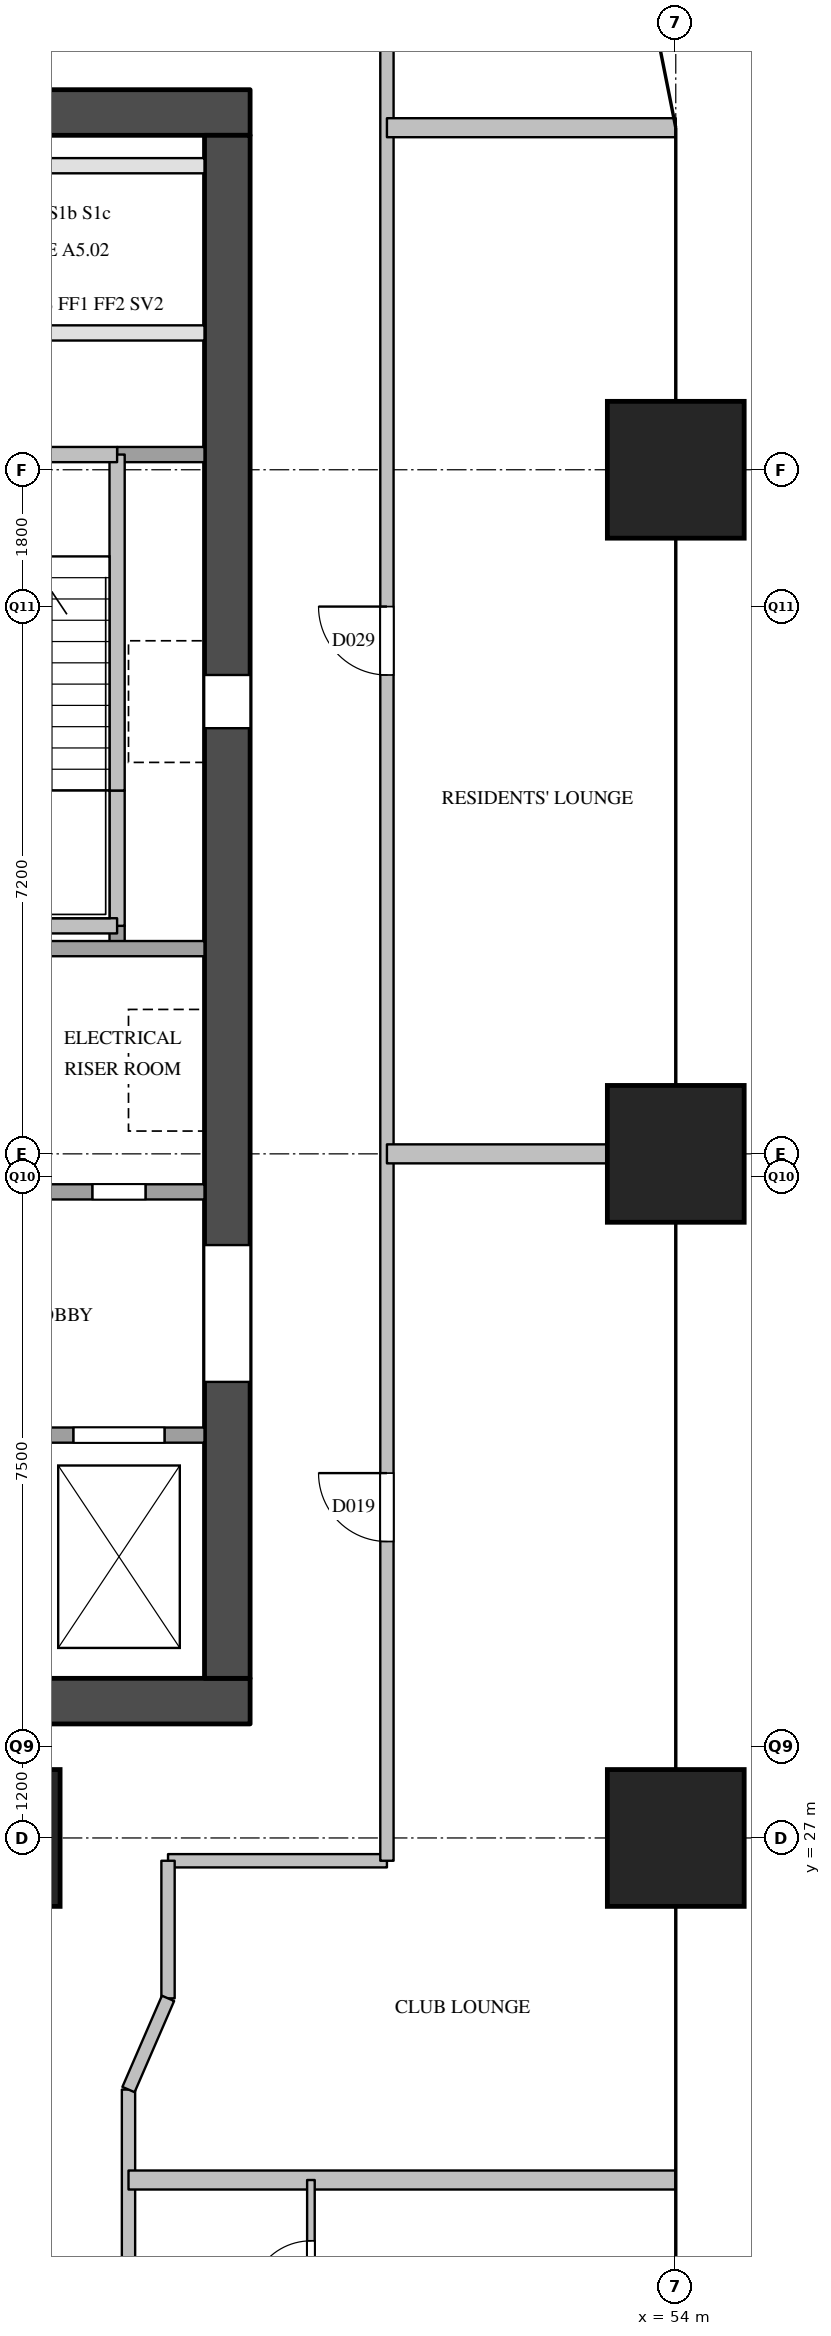
"""IFC4 building model, lengths in metres.
Left out: names, types, materials, properties, quantities, classifications, styles, units other than length and angle.
Written with IfcOpenShell. Run it as: python <this file> out.ifc"""

import sys

from ifc_helpers import new_model, si_unit, direction, frame, frame_2d, origin, origin_2d, place, context, subcontext, project, spatial, rectangle, extrude, element, fill, save


model = new_model("IFC4")
c1 = context("Model", 3, precision=1e-05, world=origin(), true_north=direction((0.0, 1.0)))
c2 = subcontext(c1, "Body", "Model", "MODEL_VIEW")
j1 = project(units=[si_unit("LENGTHUNIT", "METRE"), si_unit("PLANEANGLEUNIT", "RADIAN")], contexts=[c1])
p1 = place(None, origin())
s1 = spatial("IfcSite", under=j1, at=p1, CompositionType="ELEMENT")
p2 = place(p1, origin())
s2 = spatial("IfcBuilding", under=s1, at=p2, CompositionType="ELEMENT")
p3 = place(p2, frame((0.0, 0.0, 100.6)))
s3 = spatial("IfcBuildingStorey", under=s2, at=p3, CompositionType="ELEMENT", Elevation=100.6)
for number, where, z_axis, x_axis in (
    (1, (45.0, 27.0, 0.0), (0.0, 0.0, 1.0), (1.0, 0.0, 0.0)),
    (2, (54.0, 27.0, 0.0), (0.0, 0.0, 1.0), (1.0, 0.0, 0.0)),
    (3, (54.0, 36.0, 0.0), (0.0, 0.0, 1.0), (1.0, 0.0, 0.0)),
    (4, (54.0, 45.0, 0.0), (0.0, 0.0, 1.0), (1.0, 0.0, 0.0)),
):
    element("IfcColumn", number, at=place(p3, frame(where, z_axis=z_axis, x_axis=x_axis)), inside=s3, PredefinedType="COLUMN", context=c2, shape_type="SweptSolid", body=[
        extrude(rectangle(XDim=1.8, YDim=1.8, at=origin_2d()), origin(), (0.0, 0.0, 1.0), 3.8),
    ])
for number, where, z_axis, x_axis in (
    (5, (36.0, 28.8, 0.0), (0.0, 0.0, 1.0), (1.0, 0.0, 0.0)),
    (6, (36.0, 49.7, 0.0), (0.0, 0.0, 1.0), (1.0, 0.0, 0.0)),
):
    element("IfcWall", number, at=place(p3, frame(where, z_axis=z_axis, x_axis=x_axis)), inside=s3, PredefinedType="SHEAR", context=c2, shape_type="SweptSolid", body=[
        extrude(rectangle(XDim=12.4, YDim=0.6, at=frame_2d((6.2, 0.0))), origin(), (0.0, 0.0, 1.0), 3.5),
    ])
p4 = place(p3, frame((48.1, 29.1, 0.0), z_axis=(0.0, 0.0, 1.0), x_axis=(0.0, 1.0, 0.0)))
e7 = element("IfcWall", 7, at=p4, inside=s3, PredefinedType="SHEAR", context=c2, shape_type="SweptSolid", body=[
    extrude(rectangle(XDim=20.3, YDim=0.6, at=frame_2d((10.15, 0.0))), origin(), (0.0, 0.0, 1.0), 3.5),
])
p5 = place(p4, frame((12.5, 0.0, 0.0)))
e8 = element("IfcOpeningElement", 8, at=p5, cuts=e7, PredefinedType="OPENING", context=c2, shape_type="SweptSolid", body=[
    extrude(rectangle(XDim=0.7, YDim=2.1, at=frame_2d((0.35, 1.05))), frame((0.0, 0.31, 0.0), z_axis=(0.0, -1.0, 0.0), x_axis=(1.0, 0.0, 0.0)), (0.0, 0.0, 1.0), 0.62),
])
p6 = place(p4, frame((3.9, 0.0, 0.0)))
e9 = element("IfcOpeningElement", 9, at=p6, cuts=e7, PredefinedType="OPENING", context=c2, shape_type="SweptSolid", body=[
    extrude(rectangle(XDim=1.8, YDim=2.1, at=frame_2d((0.9, 1.05))), frame((0.0, 0.31, 0.0), z_axis=(0.0, -1.0, 0.0), x_axis=(1.0, 0.0, 0.0)), (0.0, 0.0, 1.0), 0.62),
])
p7 = place(p3, frame((46.65, 38.7, 0.0), z_axis=(0.0, 0.0, 1.0), x_axis=(0.0, 1.0, 0.0)))
e10 = element("IfcWall", 10, at=p7, inside=s3, PredefinedType="SOLIDWALL", context=c2, shape_type="SweptSolid", body=[
    extrude(rectangle(XDim=0.3, YDim=0.2, at=frame_2d((0.15, 0.0))), origin(), (0.0, 0.0, 1.0), 3.5),
])
p8 = place(p3, frame((46.65, 39.0, 0.0), z_axis=(0.0, 0.0, 1.0), x_axis=(0.0, 1.0, 0.0)))
e11 = element("IfcWall", 11, at=p8, inside=s3, PredefinedType="SOLIDWALL", context=c2, shape_type="SweptSolid", body=[
    extrude(rectangle(XDim=1.78, YDim=0.2, at=frame_2d((0.89, 0.0))), origin(), (0.0, 0.0, 1.0), 3.5),
])
p9 = place(p3, frame((46.65, 40.78, 0.0), z_axis=(0.0, 0.0, 1.0), x_axis=(0.0, 1.0, 0.0)))
e12 = element("IfcWall", 12, at=p9, inside=s3, PredefinedType="SOLIDWALL", context=c2, shape_type="SweptSolid", body=[
    extrude(rectangle(XDim=4.42, YDim=0.2, at=frame_2d((2.21, 0.0))), origin(), (0.0, 0.0, 1.0), 3.5),
])
p10 = place(p3, frame((36.6, 32.3, 0.0), z_axis=(0.0, 0.0, 1.0), x_axis=(1.0, 0.0, 0.0)))
e13 = element("IfcWall", 13, at=p10, inside=s3, PredefinedType="SOLIDWALL", context=c2, shape_type="SweptSolid", body=[
    extrude(rectangle(XDim=11.2, YDim=0.2, at=frame_2d((5.6, 0.0))), origin(), (0.0, 0.0, 1.0), 3.5),
])
p11 = place(p10, frame((7.225, 0.0, 0.0)))
e14 = element("IfcOpeningElement", 14, at=p11, cuts=e13, PredefinedType="OPENING", context=c2, shape_type="SweptSolid", body=[
    extrude(rectangle(XDim=1.2, YDim=2.1, at=frame_2d((0.6, 1.05))), frame((0.0, 0.11, 0.0), z_axis=(0.0, -1.0, 0.0), x_axis=(1.0, 0.0, 0.0)), (0.0, 0.0, 1.0), 0.22),
])
p12 = place(p10, frame((9.475, 0.0, 0.0)))
e15 = element("IfcOpeningElement", 15, at=p12, cuts=e13, PredefinedType="OPENING", context=c2, shape_type="SweptSolid", body=[
    extrude(rectangle(XDim=1.2, YDim=2.1, at=frame_2d((0.6, 1.05))), frame((0.0, 0.11, 0.0), z_axis=(0.0, -1.0, 0.0), x_axis=(1.0, 0.0, 0.0)), (0.0, 0.0, 1.0), 0.22),
])
p13 = place(p3, frame((43.3, 35.5, 0.0), z_axis=(0.0, 0.0, 1.0), x_axis=(1.0, 0.0, 0.0)))
e16 = element("IfcWall", 16, at=p13, inside=s3, PredefinedType="SOLIDWALL", context=c2, shape_type="SweptSolid", body=[
    extrude(rectangle(XDim=4.5, YDim=0.2, at=frame_2d((2.25, 0.0))), origin(), (0.0, 0.0, 1.0), 3.5),
])
p14 = place(p13, frame((0.525, 0.0, 0.0)))
e17 = element("IfcOpeningElement", 17, at=p14, cuts=e16, PredefinedType="OPENING", context=c2, shape_type="SweptSolid", body=[
    extrude(rectangle(XDim=1.2, YDim=2.1, at=frame_2d((0.6, 1.05))), frame((0.0, 0.11, 0.0), z_axis=(0.0, -1.0, 0.0), x_axis=(1.0, 0.0, 0.0)), (0.0, 0.0, 1.0), 0.22),
])
p15 = place(p13, frame((3.025, 0.0, 0.0)))
e18 = element("IfcOpeningElement", 18, at=p15, cuts=e16, PredefinedType="OPENING", context=c2, shape_type="SweptSolid", body=[
    extrude(rectangle(XDim=0.7, YDim=2.1, at=frame_2d((0.35, 1.05))), frame((0.0, 0.11, 0.0), z_axis=(0.0, -1.0, 0.0), x_axis=(1.0, 0.0, 0.0)), (0.0, 0.0, 1.0), 0.22),
])
p16 = place(p3, frame((43.3, 38.7, 0.0), z_axis=(0.0, 0.0, 1.0), x_axis=(1.0, 0.0, 0.0)))
e19 = element("IfcWall", 19, at=p16, inside=s3, PredefinedType="SOLIDWALL", context=c2, shape_type="SweptSolid", body=[
    extrude(rectangle(XDim=4.5, YDim=0.2, at=frame_2d((2.25, 0.0))), origin(), (0.0, 0.0, 1.0), 3.5),
])
p17 = place(p3, frame((43.4, 39.0, 0.0), z_axis=(0.0, 0.0, 1.0), x_axis=(1.0, 0.0, 0.0)))
e20 = element("IfcWall", 20, at=p17, inside=s3, PredefinedType="SOLIDWALL", context=c2, shape_type="SweptSolid", body=[
    extrude(rectangle(XDim=3.25, YDim=0.2, at=frame_2d((1.625, 0.0))), origin(), (0.0, 0.0, 1.0), 3.5),
])
p18 = place(p3, frame((46.65, 45.2, 0.0), z_axis=(0.0, 0.0, 1.0), x_axis=(1.0, 0.0, 0.0)))
e21 = element("IfcWall", 21, at=p18, inside=s3, PredefinedType="SOLIDWALL", context=c2, shape_type="SweptSolid", body=[
    extrude(rectangle(XDim=1.15, YDim=0.2, at=frame_2d((0.575, 0.0))), origin(), (0.0, 0.0, 1.0), 3.5),
])
p19 = place(p3, frame((36.6, 45.2, 0.0), z_axis=(0.0, 0.0, 1.0), x_axis=(1.0, 0.0, 0.0)))
e22 = element("IfcWall", 22, at=p19, inside=s3, PredefinedType="SOLIDWALL", context=c2, shape_type="SweptSolid", body=[
    extrude(rectangle(XDim=10.05, YDim=0.2, at=frame_2d((5.025, 0.0))), origin(), (0.0, 0.0, 1.0), 3.5),
])
p20 = place(p19, frame((1.125, 0.0, 0.0)))
e23 = element("IfcOpeningElement", 23, at=p20, cuts=e22, PredefinedType="OPENING", context=c2, shape_type="SweptSolid", body=[
    extrude(rectangle(XDim=1.1, YDim=2.1, at=frame_2d((0.55, 1.05))), frame((0.0, 0.11, 0.0), z_axis=(0.0, -1.0, 0.0), x_axis=(1.0, 0.0, 0.0)), (0.0, 0.0, 1.0), 0.22),
])
p21 = place(p19, frame((4.475, 0.0, 0.0)))
e24 = element("IfcOpeningElement", 24, at=p21, cuts=e22, PredefinedType="OPENING", context=c2, shape_type="SweptSolid", body=[
    extrude(rectangle(XDim=1.1, YDim=2.1, at=frame_2d((0.55, 1.05))), frame((0.0, 0.11, 0.0), z_axis=(0.0, -1.0, 0.0), x_axis=(1.0, 0.0, 0.0)), (0.0, 0.0, 1.0), 0.22),
])
p22 = place(p19, frame((7.825, 0.0, 0.0)))
e25 = element("IfcOpeningElement", 25, at=p22, cuts=e22, PredefinedType="OPENING", context=c2, shape_type="SweptSolid", body=[
    extrude(rectangle(XDim=1.1, YDim=2.1, at=frame_2d((0.55, 1.05))), frame((0.0, 0.11, 0.0), z_axis=(0.0, -1.0, 0.0), x_axis=(1.0, 0.0, 0.0)), (0.0, 0.0, 1.0), 0.22),
])
p23 = place(p3, frame((36.6, 46.8, 0.0), z_axis=(0.0, 0.0, 1.0), x_axis=(1.0, 0.0, 0.0)))
e26 = element("IfcWall", 26, at=p23, inside=s3, PredefinedType="PARTITIONING", context=c2, shape_type="SweptSolid", body=[
    extrude(rectangle(XDim=11.2, YDim=0.2, at=frame_2d((5.6, 0.0))), origin(), (0.0, 0.0, 1.0), 3.5),
])
p24 = place(p23, frame((1.23, 0.0, 0.0)))
e27 = element("IfcOpeningElement", 27, at=p24, cuts=e26, PredefinedType="OPENING", context=c2, shape_type="SweptSolid", body=[
    extrude(rectangle(XDim=0.9, YDim=2.1, at=frame_2d((0.45, 1.05))), frame((0.0, 0.11, 0.0), z_axis=(0.0, -1.0, 0.0), x_axis=(1.0, 0.0, 0.0)), (0.0, 0.0, 1.0), 0.22),
])
p25 = place(p23, frame((6.83, 0.0, 0.0)))
e28 = element("IfcOpeningElement", 28, at=p25, cuts=e26, PredefinedType="OPENING", context=c2, shape_type="SweptSolid", body=[
    extrude(rectangle(XDim=0.9, YDim=2.1, at=frame_2d((0.45, 1.05))), frame((0.0, 0.11, 0.0), z_axis=(0.0, -1.0, 0.0), x_axis=(1.0, 0.0, 0.0)), (0.0, 0.0, 1.0), 0.22),
])
p26 = place(p3, frame((36.6, 49.0, 0.0), z_axis=(0.0, 0.0, 1.0), x_axis=(1.0, 0.0, 0.0)))
e29 = element("IfcWall", 29, at=p26, inside=s3, PredefinedType="PARTITIONING", context=c2, shape_type="SweptSolid", body=[
    extrude(rectangle(XDim=11.2, YDim=0.2, at=frame_2d((5.6, 0.0))), origin(), (0.0, 0.0, 1.0), 3.5),
])
p27 = place(p3, frame((47.32, 26.7, 0.0), z_axis=(0.0, 0.0, 1.0), x_axis=(1.0, 0.0, 0.0)))
e30 = element("IfcWall", 30, at=p27, inside=s3, PredefinedType="PARTITIONING", context=c2, shape_type="SweptSolid", body=[
    extrude(rectangle(XDim=2.88, YDim=0.175, at=frame_2d((1.44, 0.0))), origin(), (0.0, 0.0, 1.0), 2.5),
])
p28 = place(p3, frame((46.8, 7.2, 0.0), z_axis=(0.0, 0.0, 1.0), x_axis=(0.0, 1.0, 0.0)))
e31 = element("IfcWall", 31, at=p28, inside=s3, PredefinedType="PARTITIONING", context=c2, shape_type="SweptSolid", body=[
    extrude(rectangle(XDim=16.49, YDim=0.175, at=frame_2d((8.245, 0.0))), origin(), (0.0, 0.0, 1.0), 3.5),
])
p29 = place(p28, frame((0.45, 0.0, 0.0)))
e32 = element("IfcOpeningElement", 32, at=p29, cuts=e31, PredefinedType="OPENING", context=c2, shape_type="SweptSolid", body=[
    extrude(rectangle(XDim=0.9, YDim=2.1, at=frame_2d((0.45, 1.05))), frame((0.0, 0.097, 0.0), z_axis=(0.0, -1.0, 0.0), x_axis=(1.0, 0.0, 0.0)), (0.0, 0.0, 1.0), 0.195),
])
p30 = place(p28, frame((4.6, 0.0, 0.0)))
e33 = element("IfcOpeningElement", 33, at=p30, cuts=e31, PredefinedType="OPENING", context=c2, shape_type="SweptSolid", body=[
    extrude(rectangle(XDim=1.0, YDim=2.1, at=frame_2d((0.5, 1.05))), frame((0.0, 0.097, 0.0), z_axis=(0.0, -1.0, 0.0), x_axis=(1.0, 0.0, 0.0)), (0.0, 0.0, 1.0), 0.195),
])
p31 = place(p28, frame((11.35, 0.0, 0.0)))
e34 = element("IfcOpeningElement", 34, at=p31, cuts=e31, PredefinedType="OPENING", context=c2, shape_type="SweptSolid", body=[
    extrude(rectangle(XDim=1.0, YDim=2.1, at=frame_2d((0.5, 1.05))), frame((0.0, 0.097, 0.0), z_axis=(0.0, -1.0, 0.0), x_axis=(1.0, 0.0, 0.0)), (0.0, 0.0, 1.0), 0.195),
])
p32 = place(p3, frame((47.32, 24.89, 0.0), z_axis=(0.0, 0.0, 1.0), x_axis=(0.0, 1.0, 0.0)))
e35 = element("IfcWall", 35, at=p32, inside=s3, PredefinedType="PARTITIONING", context=c2, shape_type="SweptSolid", body=[
    extrude(rectangle(XDim=1.81, YDim=0.175, at=frame_2d((0.905, 0.0))), origin(), (0.0, 0.0, 1.0), 2.5),
])
p33 = place(p3, frame((50.2, 26.7, 0.0), z_axis=(0.0, 0.0, 1.0), x_axis=(0.0, 1.0, 0.0)))
e36 = element("IfcWall", 36, at=p33, inside=s3, PredefinedType="PARTITIONING", context=c2, shape_type="SweptSolid", body=[
    extrude(rectangle(XDim=25.1, YDim=0.175, at=frame_2d((12.55, 0.0))), origin(), (0.0, 0.0, 1.0), 2.5),
])
p34 = place(p33, frame((4.2, 0.0, 0.0)))
e37 = element("IfcOpeningElement", 37, at=p34, cuts=e36, PredefinedType="OPENING", context=c2, shape_type="SweptSolid", body=[
    extrude(rectangle(XDim=0.9, YDim=2.1, at=frame_2d((0.45, 1.05))), frame((0.0, 0.097, 0.0), z_axis=(0.0, -1.0, 0.0), x_axis=(1.0, 0.0, 0.0)), (0.0, 0.0, 1.0), 0.195),
])
p35 = place(p33, frame((15.6, 0.0, 0.0)))
e38 = element("IfcOpeningElement", 38, at=p35, cuts=e36, PredefinedType="OPENING", context=c2, shape_type="SweptSolid", body=[
    extrude(rectangle(XDim=0.9, YDim=2.1, at=frame_2d((0.45, 1.05))), frame((0.0, 0.097, 0.0), z_axis=(0.0, -1.0, 0.0), x_axis=(1.0, 0.0, 0.0)), (0.0, 0.0, 1.0), 0.195),
])
p36 = place(p3, frame((46.8, 22.5, 0.0), z_axis=(0.0, 0.0, 1.0), x_axis=(1.0, 0.0, 0.0)))
e39 = element("IfcWall", 39, at=p36, inside=s3, PredefinedType="PARTITIONING", context=c2, shape_type="SweptSolid", body=[
    extrude(rectangle(XDim=7.2, YDim=0.25, at=frame_2d((3.6, 0.0))), origin(), (0.0, 0.0, 1.0), 2.5),
])
p37 = place(p3, frame((50.2, 36.0, 0.0), z_axis=(0.0, 0.0, 1.0), x_axis=(1.0, 0.0, 0.0)))
e40 = element("IfcWall", 40, at=p37, inside=s3, PredefinedType="PARTITIONING", context=c2, shape_type="SweptSolid", body=[
    extrude(rectangle(XDim=3.8, YDim=0.25, at=frame_2d((1.9, 0.0))), origin(), (0.0, 0.0, 1.0), 3.5),
])
p38 = place(p3, frame((50.2, 49.5, 0.0), z_axis=(0.0, 0.0, 1.0), x_axis=(1.0, 0.0, 0.0)))
e41 = element("IfcWall", 41, at=p38, inside=s3, PredefinedType="PARTITIONING", context=c2, shape_type="SweptSolid", body=[
    extrude(rectangle(XDim=3.8, YDim=0.25, at=frame_2d((1.9, 0.0))), origin(), (0.0, 0.0, 1.0), 2.5),
])
p39 = place(p3, frame((49.2, 20.1, 0.0), z_axis=(0.0, 0.0, 1.0), x_axis=(0.0, 1.0, 0.0)))
e42 = element("IfcWall", 42, at=p39, inside=s3, PredefinedType="PARTITIONING", context=c2, shape_type="SweptSolid", body=[
    extrude(rectangle(XDim=2.4, YDim=0.1, at=frame_2d((1.2, 0.0))), origin(), (0.0, 0.0, 1.0), 3.5),
])
p40 = place(p39, frame((0.8, 0.0, 0.0)))
e43 = element("IfcOpeningElement", 43, at=p40, cuts=e42, PredefinedType="OPENING", context=c2, shape_type="SweptSolid", body=[
    extrude(rectangle(XDim=0.8, YDim=2.1, at=frame_2d((0.4, 1.05))), frame((0.0, 0.06, 0.0), z_axis=(0.0, -1.0, 0.0), x_axis=(1.0, 0.0, 0.0)), (0.0, 0.0, 1.0), 0.12),
])
p41 = place(p3, frame((47.32, 24.89, 0.0), z_axis=(0.0, 0.0, 1.0), x_axis=(-0.397633632391, -0.917544273804, 0.0)))
e44 = element("IfcWall", 44, at=p41, inside=s3, PredefinedType="PARTITIONING", context=c2, shape_type="SweptSolid", body=[
    extrude(rectangle(XDim=1.308, YDim=0.175, at=frame_2d((0.654, 0.0))), origin(), (0.0, 0.0, 1.0), 3.5),
])
p42 = place(p12, origin())
e45 = element("IfcDoor", 45, at=p42, inside=s3, OperationType="SLIDING_TO_LEFT", PredefinedType="DOOR", context=c2, shape_type="SweptSolid", body=[
    extrude(rectangle(XDim=1.2, YDim=2.1, at=frame_2d((0.6, 1.05))), frame((0.0, 0.025, 0.0), z_axis=(0.0, -1.0, 0.0), x_axis=(1.0, 0.0, 0.0)), (0.0, 0.0, 1.0), 0.05),
])
fill(e15, e45)
p43 = place(p5, origin())
e46 = element("IfcDoor", 46, at=p43, inside=s3, OperationType="SINGLE_SWING_RIGHT", PredefinedType="DOOR", context=c2, shape_type="SweptSolid", body=[
    extrude(rectangle(XDim=0.7, YDim=2.1, at=frame_2d((0.35, 1.05))), frame((0.0, 0.025, 0.0), z_axis=(0.0, -1.0, 0.0), x_axis=(1.0, 0.0, 0.0)), (0.0, 0.0, 1.0), 0.05),
])
fill(e8, e46)
p44 = place(p6, origin())
e47 = element("IfcDoor", 47, at=p44, inside=s3, OperationType="DOUBLE_DOOR_SINGLE_SWING", PredefinedType="DOOR", context=c2, shape_type="SweptSolid", body=[
    extrude(rectangle(XDim=1.8, YDim=2.1, at=frame_2d((0.9, 1.05))), frame((0.0, 0.025, 0.0), z_axis=(0.0, -1.0, 0.0), x_axis=(1.0, 0.0, 0.0)), (0.0, 0.0, 1.0), 0.05),
])
fill(e9, e47)
p45 = place(p15, origin())
e48 = element("IfcDoor", 48, at=p45, inside=s3, OperationType="SINGLE_SWING_RIGHT", PredefinedType="DOOR", context=c2, shape_type="SweptSolid", body=[
    extrude(rectangle(XDim=0.7, YDim=2.1, at=frame_2d((0.35, 1.05))), frame((0.0, 0.025, 0.0), z_axis=(0.0, -1.0, 0.0), x_axis=(1.0, 0.0, 0.0)), (0.0, 0.0, 1.0), 0.05),
])
fill(e18, e48)
p46 = place(p40, origin())
e49 = element("IfcDoor", 49, at=p46, inside=s3, OperationType="SINGLE_SWING_LEFT", PredefinedType="DOOR", context=c2, shape_type="SweptSolid", body=[
    extrude(rectangle(XDim=0.8, YDim=2.1, at=frame_2d((0.4, 1.05))), frame((0.0, 0.025, 0.0), z_axis=(0.0, -1.0, 0.0), x_axis=(1.0, 0.0, 0.0)), (0.0, 0.0, 1.0), 0.05),
])
fill(e43, e49)
p47 = place(p34, origin())
e50 = element("IfcDoor", 50, at=p47, inside=s3, OperationType="SINGLE_SWING_RIGHT", PredefinedType="DOOR", context=c2, shape_type="SweptSolid", body=[
    extrude(rectangle(XDim=0.9, YDim=2.1, at=frame_2d((0.45, 1.05))), frame((0.0, 0.025, 0.0), z_axis=(0.0, -1.0, 0.0), x_axis=(1.0, 0.0, 0.0)), (0.0, 0.0, 1.0), 0.05),
])
fill(e37, e50)
p48 = place(p35, origin())
e51 = element("IfcDoor", 51, at=p48, inside=s3, OperationType="SINGLE_SWING_RIGHT", PredefinedType="DOOR", context=c2, shape_type="SweptSolid", body=[
    extrude(rectangle(XDim=0.9, YDim=2.1, at=frame_2d((0.45, 1.05))), frame((0.0, 0.025, 0.0), z_axis=(0.0, -1.0, 0.0), x_axis=(1.0, 0.0, 0.0)), (0.0, 0.0, 1.0), 0.05),
])
fill(e38, e51)
save(model, sys.argv[1])
